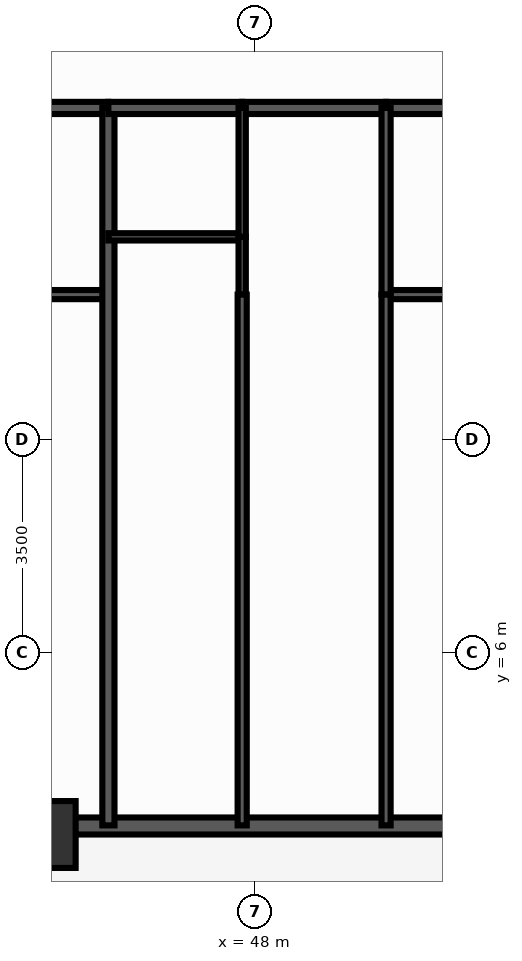
"""IFC4 building model, lengths in metres.
Left out: names, types, materials, properties, quantities, classifications, styles, units other than length and angle.
Written with IfcOpenShell. Run it as: python <this file> out.ifc"""

import sys

from ifc_helpers import new_model, si_unit, direction, frame, frame_2d, origin, origin_2d, place, context, subcontext, project, spatial, rectangle, extrude, source, transform, mapped, element, fill, save


model = new_model("IFC4")
c1 = context("Model", 3, precision=1e-05, world=origin(), true_north=direction((0.0, 1.0)))
c2 = subcontext(c1, "Body", "Model", "MODEL_VIEW")
j1 = project(units=[si_unit("LENGTHUNIT", "METRE"), si_unit("PLANEANGLEUNIT", "RADIAN")], contexts=[c1])
p1 = place(None, origin())
s1 = spatial("IfcSite", under=j1, at=p1, CompositionType="ELEMENT")
p2 = place(p1, origin())
s2 = spatial("IfcBuilding", under=s1, at=p2, CompositionType="ELEMENT")
p3 = place(p2, frame((0.0, 0.0, 19.4)))
s3 = spatial("IfcBuildingStorey", under=s2, at=p3, CompositionType="ELEMENT", Elevation=19.4)
m1 = source(origin(), c2, "Body", "SweptSolid", [
    extrude(rectangle(XDim=1.1, YDim=1.1, at=origin_2d()), origin(), (0.0, 0.0, 1.0), 3.0),
])
p4 = place(p3, frame((44.5, 3.0, 0.0), z_axis=(0.0, 0.0, 1.0), x_axis=(1.0, 0.0, 0.0)))
e1 = element("IfcColumn", 1, at=p4, inside=s3, PredefinedType="COLUMN", context=c2, shape_type="MappedRepresentation", body=[
    mapped(m1, transform((0.0, 0.0, 0.0), scale=1.0)),
])
p5 = place(p3, frame((15.5, 3.14, 0.0), z_axis=(0.0, 0.0, 1.0), x_axis=(1.0, 0.0, 0.0)))
e2 = element("IfcWall", 2, at=p5, inside=s3, PredefinedType="SOLIDWALL", context=c2, shape_type="SweptSolid", body=[
    extrude(rectangle(XDim=45.0, YDim=0.28, at=frame_2d((22.5, 0.0))), origin(), (0.0, 0.0, 1.0), 2.28),
])
p6 = place(p5, frame((0.785, 0.0, 0.25)))
e3 = element("IfcOpeningElement", 3, at=p6, cuts=e2, PredefinedType="OPENING", context=c2, shape_type="SweptSolid", body=[
    extrude(rectangle(XDim=1.2, YDim=1.5, at=frame_2d((0.6, 0.75))), frame((0.0, 0.152, 0.0), z_axis=(0.0, -1.0, 0.0), x_axis=(1.0, 0.0, 0.0)), (0.0, 0.0, 1.0), 0.304),
])
p7 = place(p5, frame((3.033, 0.0, 0.25)))
e4 = element("IfcOpeningElement", 4, at=p7, cuts=e2, PredefinedType="OPENING", context=c2, shape_type="SweptSolid", body=[
    extrude(rectangle(XDim=1.2, YDim=1.5, at=frame_2d((0.6, 0.75))), frame((0.0, 0.152, 0.0), z_axis=(0.0, -1.0, 0.0), x_axis=(1.0, 0.0, 0.0)), (0.0, 0.0, 1.0), 0.304),
])
p8 = place(p5, frame((5.727, 0.0, 0.25)))
e5 = element("IfcOpeningElement", 5, at=p8, cuts=e2, PredefinedType="OPENING", context=c2, shape_type="SweptSolid", body=[
    extrude(rectangle(XDim=1.2, YDim=1.5, at=frame_2d((0.6, 0.75))), frame((0.0, 0.152, 0.0), z_axis=(0.0, -1.0, 0.0), x_axis=(1.0, 0.0, 0.0)), (0.0, 0.0, 1.0), 0.304),
])
p9 = place(p5, frame((8.269, 0.0, 0.25)))
e6 = element("IfcOpeningElement", 6, at=p9, cuts=e2, PredefinedType="OPENING", context=c2, shape_type="SweptSolid", body=[
    extrude(rectangle(XDim=1.2, YDim=1.5, at=frame_2d((0.6, 0.75))), frame((0.0, 0.152, 0.0), z_axis=(0.0, -1.0, 0.0), x_axis=(1.0, 0.0, 0.0)), (0.0, 0.0, 1.0), 0.304),
])
p10 = place(p5, frame((10.621, 0.0, 0.25)))
e7 = element("IfcOpeningElement", 7, at=p10, cuts=e2, PredefinedType="OPENING", context=c2, shape_type="SweptSolid", body=[
    extrude(rectangle(XDim=1.2, YDim=1.5, at=frame_2d((0.6, 0.75))), frame((0.0, 0.152, 0.0), z_axis=(0.0, -1.0, 0.0), x_axis=(1.0, 0.0, 0.0)), (0.0, 0.0, 1.0), 0.304),
])
p11 = place(p5, frame((13.316, 0.0, 0.25)))
e8 = element("IfcOpeningElement", 8, at=p11, cuts=e2, PredefinedType="OPENING", context=c2, shape_type="SweptSolid", body=[
    extrude(rectangle(XDim=1.2, YDim=1.5, at=frame_2d((0.6, 0.75))), frame((0.0, 0.152, 0.0), z_axis=(0.0, -1.0, 0.0), x_axis=(1.0, 0.0, 0.0)), (0.0, 0.0, 1.0), 0.304),
])
p12 = place(p5, frame((16.624, 0.0, 0.25)))
e9 = element("IfcOpeningElement", 9, at=p12, cuts=e2, PredefinedType="OPENING", context=c2, shape_type="SweptSolid", body=[
    extrude(rectangle(XDim=0.7, YDim=1.5, at=frame_2d((0.35, 0.75))), frame((0.0, 0.152, 0.0), z_axis=(0.0, -1.0, 0.0), x_axis=(1.0, 0.0, 0.0)), (0.0, 0.0, 1.0), 0.304),
])
p13 = place(p5, frame((18.141, 0.0, 0.25)))
e10 = element("IfcOpeningElement", 10, at=p13, cuts=e2, PredefinedType="OPENING", context=c2, shape_type="SweptSolid", body=[
    extrude(rectangle(XDim=1.2, YDim=1.5, at=frame_2d((0.6, 0.75))), frame((0.0, 0.152, 0.0), z_axis=(0.0, -1.0, 0.0), x_axis=(1.0, 0.0, 0.0)), (0.0, 0.0, 1.0), 0.304),
])
p14 = place(p5, frame((21.874, 0.0, 0.0), z_axis=(0.0, 0.0, 1.0), x_axis=(-1.0, 0.0, 0.0)))
e11 = element("IfcOpeningElement", 11, at=p14, cuts=e2, PredefinedType="OPENING", context=c2, shape_type="SweptSolid", body=[
    extrude(rectangle(XDim=1.1, YDim=2.15, at=frame_2d((0.55, 1.075))), frame((0.0, 0.152, 0.0), z_axis=(0.0, -1.0, 0.0), x_axis=(1.0, 0.0, 0.0)), (0.0, 0.0, 1.0), 0.304),
])
p15 = place(p5, frame((23.223, 0.0, 0.25)))
e12 = element("IfcOpeningElement", 12, at=p15, cuts=e2, PredefinedType="OPENING", context=c2, shape_type="SweptSolid", body=[
    extrude(rectangle(XDim=1.2, YDim=1.5, at=frame_2d((0.6, 0.75))), frame((0.0, 0.152, 0.0), z_axis=(0.0, -1.0, 0.0), x_axis=(1.0, 0.0, 0.0)), (0.0, 0.0, 1.0), 0.304),
])
p16 = place(p5, frame((25.507, 0.0, 0.25)))
e13 = element("IfcOpeningElement", 13, at=p16, cuts=e2, PredefinedType="OPENING", context=c2, shape_type="SweptSolid", body=[
    extrude(rectangle(XDim=1.2, YDim=1.5, at=frame_2d((0.6, 0.75))), frame((0.0, 0.152, 0.0), z_axis=(0.0, -1.0, 0.0), x_axis=(1.0, 0.0, 0.0)), (0.0, 0.0, 1.0), 0.304),
])
p17 = place(p5, frame((27.6, 0.0, 0.25)))
e14 = element("IfcOpeningElement", 14, at=p17, cuts=e2, PredefinedType="OPENING", context=c2, shape_type="SweptSolid", body=[
    extrude(rectangle(XDim=0.7, YDim=1.5, at=frame_2d((0.35, 0.75))), frame((0.0, 0.152, 0.0), z_axis=(0.0, -1.0, 0.0), x_axis=(1.0, 0.0, 0.0)), (0.0, 0.0, 1.0), 0.304),
])
p18 = place(p5, frame((30.589, 0.0, 0.25)))
e15 = element("IfcOpeningElement", 15, at=p18, cuts=e2, PredefinedType="OPENING", context=c2, shape_type="SweptSolid", body=[
    extrude(rectangle(XDim=1.2, YDim=1.5, at=frame_2d((0.6, 0.75))), frame((0.0, 0.152, 0.0), z_axis=(0.0, -1.0, 0.0), x_axis=(1.0, 0.0, 0.0)), (0.0, 0.0, 1.0), 0.304),
])
p19 = place(p5, frame((32.872, 0.0, 0.25)))
e16 = element("IfcOpeningElement", 16, at=p19, cuts=e2, PredefinedType="OPENING", context=c2, shape_type="SweptSolid", body=[
    extrude(rectangle(XDim=1.2, YDim=1.5, at=frame_2d((0.6, 0.75))), frame((0.0, 0.152, 0.0), z_axis=(0.0, -1.0, 0.0), x_axis=(1.0, 0.0, 0.0)), (0.0, 0.0, 1.0), 0.304),
])
p20 = place(p5, frame((35.455, 0.0, 0.25)))
e17 = element("IfcOpeningElement", 17, at=p20, cuts=e2, PredefinedType="OPENING", context=c2, shape_type="SweptSolid", body=[
    extrude(rectangle(XDim=1.2, YDim=1.5, at=frame_2d((0.6, 0.75))), frame((0.0, 0.152, 0.0), z_axis=(0.0, -1.0, 0.0), x_axis=(1.0, 0.0, 0.0)), (0.0, 0.0, 1.0), 0.304),
])
p21 = place(p5, frame((37.954, 0.0, 0.25)))
e18 = element("IfcOpeningElement", 18, at=p21, cuts=e2, PredefinedType="OPENING", context=c2, shape_type="SweptSolid", body=[
    extrude(rectangle(XDim=1.2, YDim=1.5, at=frame_2d((0.6, 0.75))), frame((0.0, 0.152, 0.0), z_axis=(0.0, -1.0, 0.0), x_axis=(1.0, 0.0, 0.0)), (0.0, 0.0, 1.0), 0.304),
])
p22 = place(p5, frame((40.238, 0.0, 0.25)))
e19 = element("IfcOpeningElement", 19, at=p22, cuts=e2, PredefinedType="OPENING", context=c2, shape_type="SweptSolid", body=[
    extrude(rectangle(XDim=1.2, YDim=1.5, at=frame_2d((0.6, 0.75))), frame((0.0, 0.152, 0.0), z_axis=(0.0, -1.0, 0.0), x_axis=(1.0, 0.0, 0.0)), (0.0, 0.0, 1.0), 0.304),
])
p23 = place(p5, frame((42.716, 0.0, 0.25)))
e20 = element("IfcOpeningElement", 20, at=p23, cuts=e2, PredefinedType="OPENING", context=c2, shape_type="SweptSolid", body=[
    extrude(rectangle(XDim=1.2, YDim=1.5, at=frame_2d((0.6, 0.75))), frame((0.0, 0.152, 0.0), z_axis=(0.0, -1.0, 0.0), x_axis=(1.0, 0.0, 0.0)), (0.0, 0.0, 1.0), 0.304),
])
p24 = place(p3, frame((42.79, 14.95, 0.0), z_axis=(0.0, 0.0, 1.0), x_axis=(1.0, 0.0, 0.0)))
e21 = element("IfcWall", 21, at=p24, inside=s3, PredefinedType="PARTITIONING", context=c2, shape_type="SweptSolid", body=[
    extrude(rectangle(XDim=2.799, YDim=0.2, at=frame_2d((1.399, 0.0))), origin(), (0.0, 0.0, 1.0), 2.79),
])
p25 = place(p3, frame((42.79, 11.88, 0.0), z_axis=(0.0, 0.0, 1.0), x_axis=(1.0, 0.0, 0.0)))
e22 = element("IfcWall", 22, at=p25, inside=s3, PredefinedType="PARTITIONING", context=c2, shape_type="SweptSolid", body=[
    extrude(rectangle(XDim=2.799, YDim=0.15, at=frame_2d((1.399, 0.0))), origin(), (0.0, 0.0, 1.0), 2.79),
])
p26 = place(p3, frame((45.589, 14.95, 0.0), z_axis=(0.0, 0.0, 1.0), x_axis=(0.0, -1.0, 0.0)))
e23 = element("IfcWall", 23, at=p26, inside=s3, PredefinedType="PARTITIONING", context=c2, shape_type="SweptSolid", body=[
    extrude(rectangle(XDim=11.8, YDim=0.2, at=frame_2d((5.9, 0.0))), origin(), (0.0, 0.0, 1.0), 2.24),
])
p27 = place(p3, frame((45.589, 14.95, 0.0), z_axis=(0.0, 0.0, 1.0), x_axis=(1.0, 0.0, 0.0)))
e24 = element("IfcWall", 24, at=p27, inside=s3, PredefinedType="PARTITIONING", context=c2, shape_type="SweptSolid", body=[
    extrude(rectangle(XDim=2.2, YDim=0.2, at=frame_2d((1.1, 0.0))), origin(), (0.0, 0.0, 1.0), 2.79),
])
p28 = place(p3, frame((47.789, 14.95, 0.0), z_axis=(0.0, 0.0, 1.0), x_axis=(1.0, 0.0, 0.0)))
e25 = element("IfcWall", 25, at=p28, inside=s3, PredefinedType="PARTITIONING", context=c2, shape_type="SweptSolid", body=[
    extrude(rectangle(XDim=2.367, YDim=0.2, at=frame_2d((1.183, 0.0))), origin(), (0.0, 0.0, 1.0), 2.79),
])
p29 = place(p28, frame((0.683, 0.0, 0.0)))
e26 = element("IfcOpeningElement", 26, at=p29, cuts=e25, PredefinedType="OPENING", context=c2, shape_type="SweptSolid", body=[
    extrude(rectangle(XDim=1.0, YDim=2.15, at=frame_2d((0.5, 1.075))), frame((0.0, 0.112, 0.0), z_axis=(0.0, -1.0, 0.0), x_axis=(1.0, 0.0, 0.0)), (0.0, 0.0, 1.0), 0.224),
])
p30 = place(p3, frame((50.156, 14.95, 0.0), z_axis=(0.0, 0.0, 1.0), x_axis=(1.0, 0.0, 0.0)))
e27 = element("IfcWall", 27, at=p30, inside=s3, PredefinedType="PARTITIONING", context=c2, shape_type="SweptSolid", body=[
    extrude(rectangle(XDim=2.799, YDim=0.2, at=frame_2d((1.399, 0.0))), origin(), (0.0, 0.0, 1.0), 2.79),
])
p31 = place(p3, frame((45.589, 12.83, 0.0), z_axis=(0.0, 0.0, 1.0), x_axis=(1.0, 0.0, 0.0)))
e28 = element("IfcWall", 28, at=p31, inside=s3, PredefinedType="PARTITIONING", context=c2, shape_type="SweptSolid", body=[
    extrude(rectangle(XDim=2.2, YDim=0.12, at=frame_2d((1.1, 0.0))), origin(), (0.0, 0.0, 1.0), 2.79),
])
p32 = place(p3, frame((50.156, 11.88, 0.0), z_axis=(0.0, 0.0, 1.0), x_axis=(1.0, 0.0, 0.0)))
e29 = element("IfcWall", 29, at=p32, inside=s3, PredefinedType="PARTITIONING", context=c2, shape_type="SweptSolid", body=[
    extrude(rectangle(XDim=2.799, YDim=0.15, at=frame_2d((1.399, 0.0))), origin(), (0.0, 0.0, 1.0), 2.79),
])
p33 = place(p3, frame((47.789, 14.95, 0.0), z_axis=(0.0, 0.0, 1.0), x_axis=(0.0, -1.0, 0.0)))
e30 = element("IfcWall", 30, at=p33, inside=s3, PredefinedType="PARTITIONING", context=c2, shape_type="SweptSolid", body=[
    extrude(rectangle(XDim=2.12, YDim=0.12, at=frame_2d((1.06, 0.0))), origin(), (0.0, 0.0, 1.0), 2.79),
])
p34 = place(p33, frame((0.635, 0.0, 0.0)))
e31 = element("IfcOpeningElement", 31, at=p34, cuts=e30, PredefinedType="OPENING", context=c2, shape_type="SweptSolid", body=[
    extrude(rectangle(XDim=0.85, YDim=2.05, at=frame_2d((0.425, 1.025))), frame((0.0, 0.072, 0.0), z_axis=(0.0, -1.0, 0.0), x_axis=(1.0, 0.0, 0.0)), (0.0, 0.0, 1.0), 0.144),
])
p35 = place(p3, frame((47.789, 12.83, 0.0), z_axis=(0.0, 0.0, 1.0), x_axis=(0.0, -1.0, 0.0)))
e32 = element("IfcWall", 32, at=p35, inside=s3, PredefinedType="PARTITIONING", context=c2, shape_type="SweptSolid", body=[
    extrude(rectangle(XDim=0.95, YDim=0.12, at=frame_2d((0.475, 0.0))), origin(), (0.0, 0.0, 1.0), 2.79),
])
p36 = place(p3, frame((47.789, 11.88, 0.0), z_axis=(0.0, 0.0, 1.0), x_axis=(0.0, -1.0, 0.0)))
e33 = element("IfcWall", 33, at=p36, inside=s3, PredefinedType="PARTITIONING", context=c2, shape_type="SweptSolid", body=[
    extrude(rectangle(XDim=8.73, YDim=0.15, at=frame_2d((4.365, 0.0))), origin(), (0.0, 0.0, 1.0), 2.79),
])
p37 = place(p36, frame((3.609, 0.0, 0.0)))
e34 = element("IfcOpeningElement", 34, at=p37, cuts=e33, PredefinedType="OPENING", context=c2, shape_type="SweptSolid", body=[
    extrude(rectangle(XDim=0.9, YDim=2.1, at=frame_2d((0.45, 1.05))), frame((0.0, 0.087, 0.0), z_axis=(0.0, -1.0, 0.0), x_axis=(1.0, 0.0, 0.0)), (0.0, 0.0, 1.0), 0.174),
])
p38 = place(p3, frame((50.156, 14.95, 0.0), z_axis=(0.0, 0.0, 1.0), x_axis=(0.0, -1.0, 0.0)))
e35 = element("IfcWall", 35, at=p38, inside=s3, PredefinedType="PARTITIONING", context=c2, shape_type="SweptSolid", body=[
    extrude(rectangle(XDim=3.07, YDim=0.15, at=frame_2d((1.535, 0.0))), origin(), (0.0, 0.0, 1.0), 2.79),
])
p39 = place(p38, frame((1.085, 0.0, 0.0)))
e36 = element("IfcOpeningElement", 36, at=p39, cuts=e35, PredefinedType="OPENING", context=c2, shape_type="SweptSolid", body=[
    extrude(rectangle(XDim=0.9, YDim=2.1, at=frame_2d((0.45, 1.05))), frame((0.0, 0.087, 0.0), z_axis=(0.0, -1.0, 0.0), x_axis=(1.0, 0.0, 0.0)), (0.0, 0.0, 1.0), 0.174),
])
p40 = place(p3, frame((50.156, 11.88, 0.0), z_axis=(0.0, 0.0, 1.0), x_axis=(0.0, -1.0, 0.0)))
e37 = element("IfcWall", 37, at=p40, inside=s3, PredefinedType="PARTITIONING", context=c2, shape_type="SweptSolid", body=[
    extrude(rectangle(XDim=8.73, YDim=0.15, at=frame_2d((4.365, 0.0))), origin(), (0.0, 0.0, 1.0), 2.79),
])
p41 = place(p40, frame((3.609, 0.0, 0.0)))
e38 = element("IfcOpeningElement", 38, at=p41, cuts=e37, PredefinedType="OPENING", context=c2, shape_type="SweptSolid", body=[
    extrude(rectangle(XDim=0.9, YDim=2.1, at=frame_2d((0.45, 1.05))), frame((0.0, 0.087, 0.0), z_axis=(0.0, -1.0, 0.0), x_axis=(1.0, 0.0, 0.0)), (0.0, 0.0, 1.0), 0.174),
])
m2 = source(origin(), c2, "Body", "SweptSolid", [
    extrude(rectangle(XDim=1.2, YDim=1.5, at=frame_2d((0.6, 0.75))), frame((0.0, 0.03, 0.0), z_axis=(0.0, -1.0, 0.0), x_axis=(1.0, 0.0, 0.0)), (0.0, 0.0, 1.0), 0.06),
])
p42 = place(p18, origin())
e39 = element("IfcWindow", 39, at=p42, inside=s3, PartitioningType="SINGLE_PANEL", PredefinedType="WINDOW", context=c2, shape_type="MappedRepresentation", body=[
    mapped(m2, transform((0.0, 0.0, 0.0), scale=1.0)),
])
fill(e15, e39)
p43 = place(p19, origin())
e40 = element("IfcWindow", 40, at=p43, inside=s3, PartitioningType="SINGLE_PANEL", PredefinedType="WINDOW", context=c2, shape_type="MappedRepresentation", body=[
    mapped(m2, transform((0.0, 0.0, 0.0), scale=1.0)),
])
fill(e16, e40)
p44 = place(p20, origin())
e41 = element("IfcWindow", 41, at=p44, inside=s3, PartitioningType="SINGLE_PANEL", PredefinedType="WINDOW", context=c2, shape_type="MappedRepresentation", body=[
    mapped(m2, transform((0.0, 0.0, 0.0), scale=1.0)),
])
fill(e17, e41)
m3 = source(origin(), c2, "Body", "SweptSolid", [
    extrude(rectangle(XDim=1.0, YDim=2.15, at=frame_2d((0.5, 1.075))), frame((0.0, 0.025, 0.0), z_axis=(0.0, -1.0, 0.0), x_axis=(1.0, 0.0, 0.0)), (0.0, 0.0, 1.0), 0.05),
])
p45 = place(p29, origin())
e42 = element("IfcDoor", 42, at=p45, inside=s3, OperationType="SINGLE_SWING_LEFT", PredefinedType="DOOR", context=c2, shape_type="MappedRepresentation", body=[
    mapped(m3, transform((0.0, 0.0, 0.0), scale=1.0)),
])
fill(e26, e42)
m4 = source(origin(), c2, "Body", "SweptSolid", [
    extrude(rectangle(XDim=0.85, YDim=2.05, at=frame_2d((0.425, 1.025))), frame((0.0, 0.025, 0.0), z_axis=(0.0, -1.0, 0.0), x_axis=(1.0, 0.0, 0.0)), (0.0, 0.0, 1.0), 0.05),
])
p46 = place(p34, origin())
e43 = element("IfcDoor", 43, at=p46, inside=s3, OperationType="SINGLE_SWING_RIGHT", PredefinedType="DOOR", context=c2, shape_type="MappedRepresentation", body=[
    mapped(m4, transform((0.0, 0.0, 0.0), scale=1.0)),
])
fill(e31, e43)
m5 = source(origin(), c2, "Body", "SweptSolid", [
    extrude(rectangle(XDim=0.9, YDim=2.1, at=frame_2d((0.45, 1.05))), frame((0.0, 0.025, 0.0), z_axis=(0.0, -1.0, 0.0), x_axis=(1.0, 0.0, 0.0)), (0.0, 0.0, 1.0), 0.05),
])
p47 = place(p37, origin())
e44 = element("IfcDoor", 44, at=p47, inside=s3, OperationType="SINGLE_SWING_LEFT", PredefinedType="DOOR", context=c2, shape_type="MappedRepresentation", body=[
    mapped(m5, transform((0.0, 0.0, 0.0), scale=1.0)),
])
fill(e34, e44)
p48 = place(p39, origin())
e45 = element("IfcDoor", 45, at=p48, inside=s3, OperationType="SINGLE_SWING_RIGHT", PredefinedType="DOOR", context=c2, shape_type="MappedRepresentation", body=[
    mapped(m5, transform((0.0, 0.0, 0.0), scale=1.0)),
])
fill(e36, e45)
p49 = place(p41, origin())
e46 = element("IfcDoor", 46, at=p49, inside=s3, OperationType="SINGLE_SWING_LEFT", PredefinedType="DOOR", context=c2, shape_type="MappedRepresentation", body=[
    mapped(m5, transform((0.0, 0.0, 0.0), scale=1.0)),
])
fill(e38, e46)
save(model, sys.argv[1])
